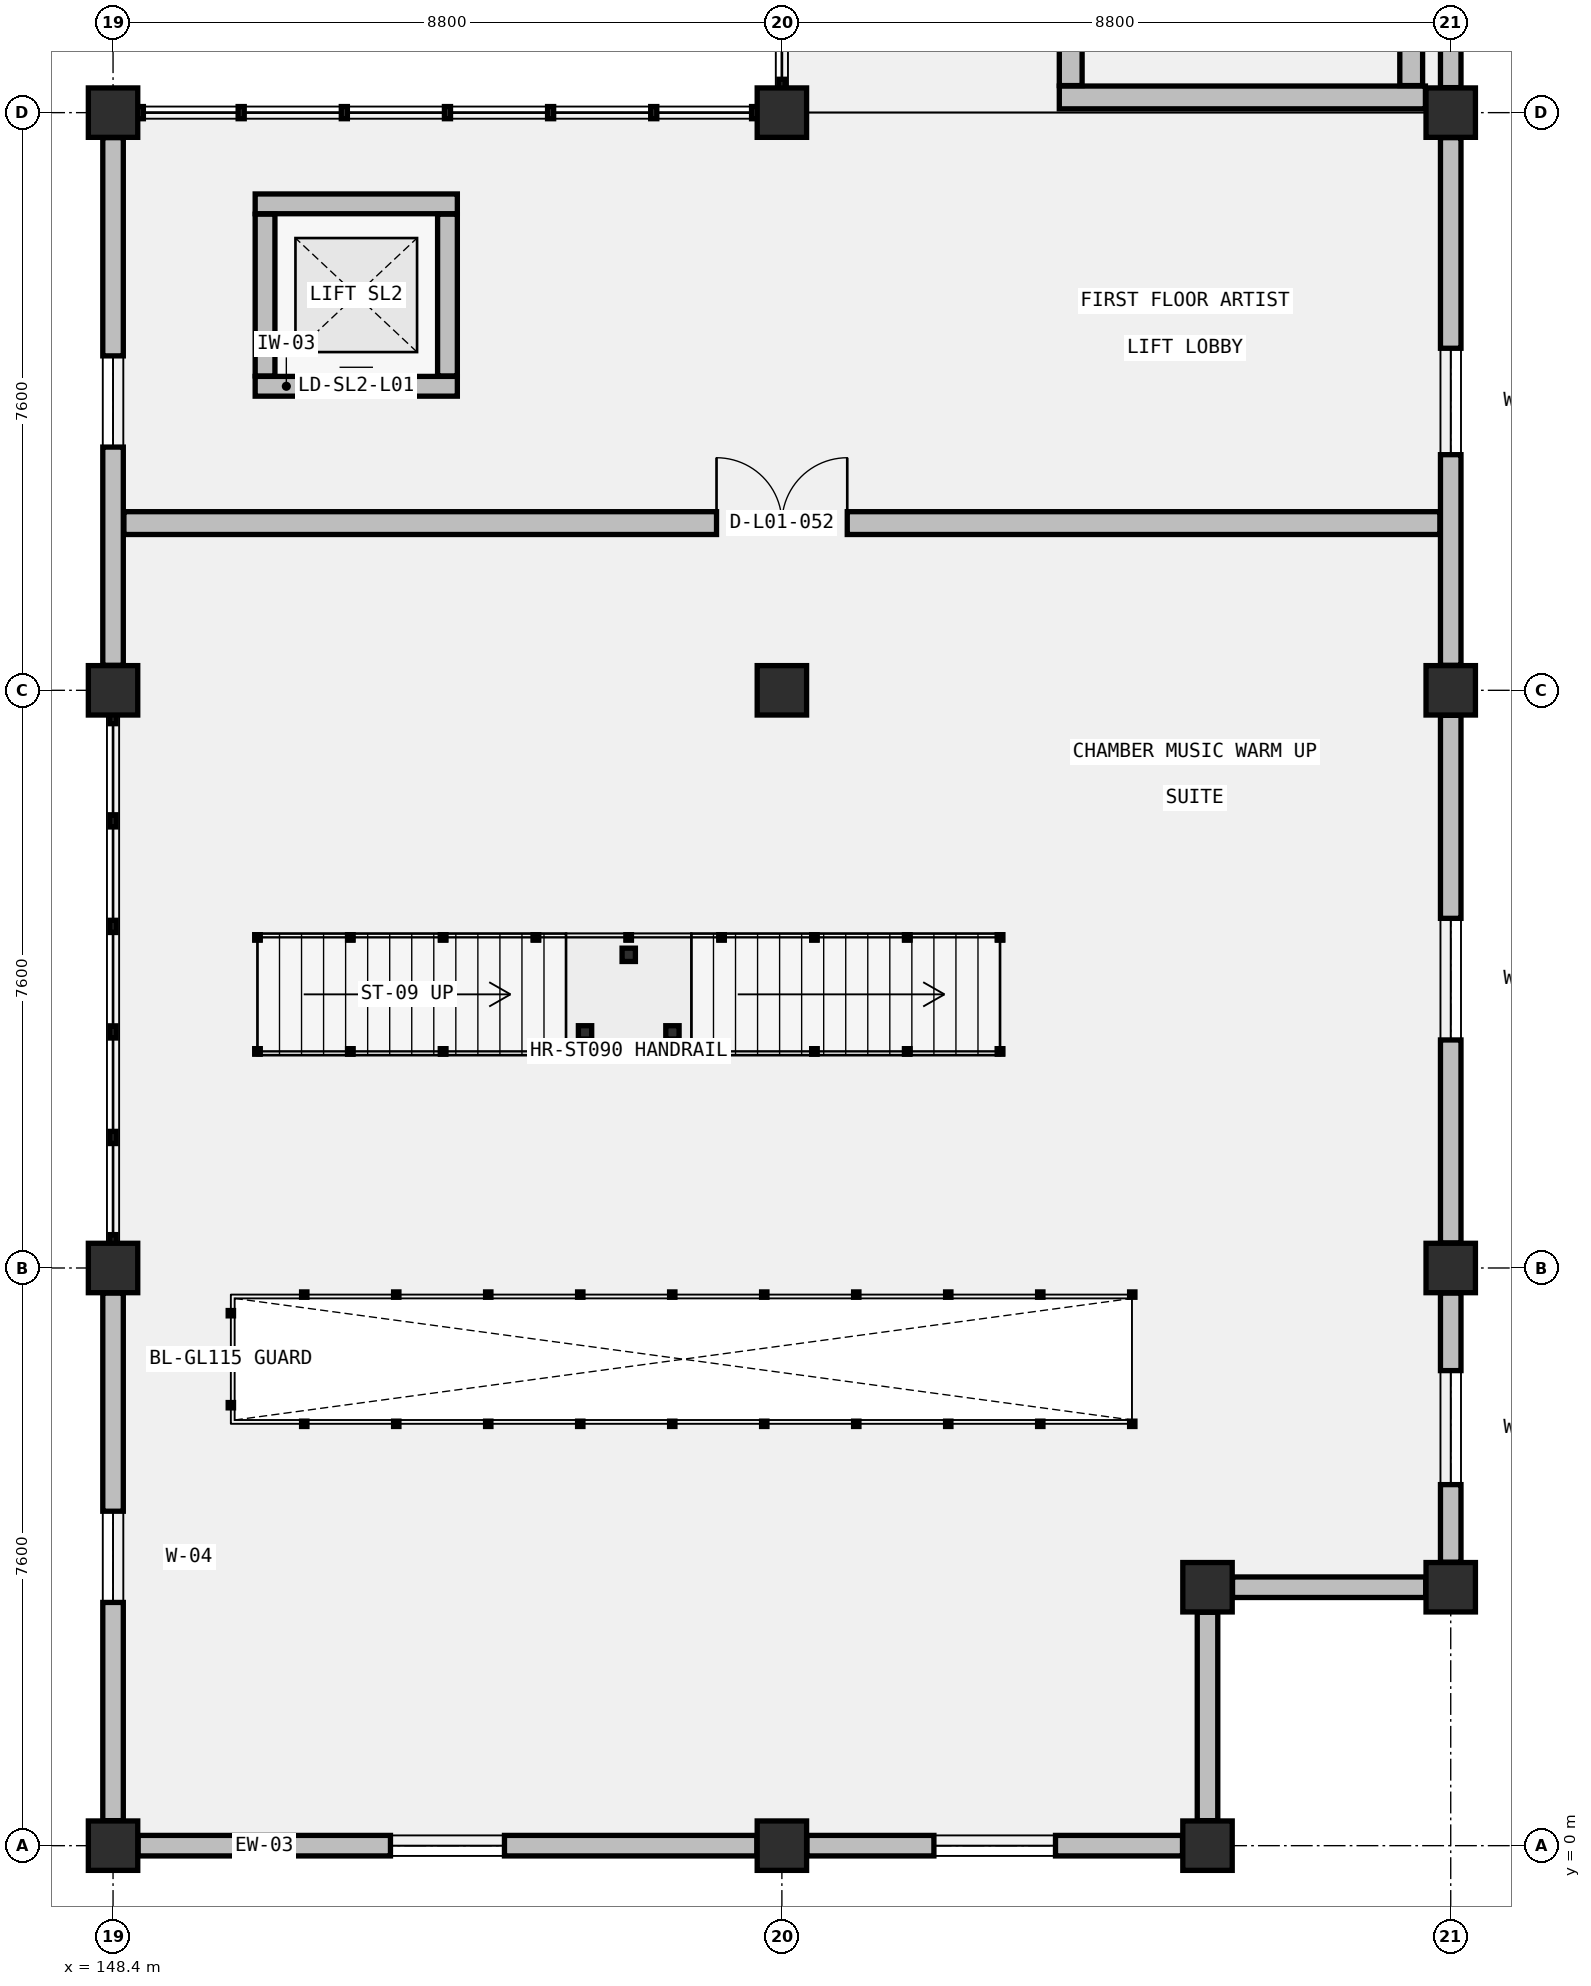
"""IFC4 building model, lengths in metres.
Left out: names, types, materials, properties, quantities, classifications, styles, units other than length and angle.
Written with IfcOpenShell. Run it as: python <this file> out.ifc"""

import sys

from ifc_helpers import new_model, si_unit, direction, frame, frame_2d, origin, origin_2d, place, context, subcontext, project, spatial, rectangle, i_section, extrude, element, fill, save


model = new_model("IFC4")
c1 = context("Model", 3, precision=1e-05, world=origin(), true_north=direction((0.0, 1.0)))
c2 = subcontext(c1, "Body", "Model", "MODEL_VIEW")
j1 = project(units=[si_unit("LENGTHUNIT", "METRE"), si_unit("PLANEANGLEUNIT", "RADIAN")], contexts=[c1])
p1 = place(None, origin())
s1 = spatial("IfcSite", under=j1, at=p1, CompositionType="ELEMENT")
p2 = place(p1, origin())
s2 = spatial("IfcBuilding", under=s1, at=p2, CompositionType="ELEMENT")
p3 = place(p2, frame((0.0, 0.0, 5.4)))
s3 = spatial("IfcBuildingStorey", under=s2, at=p3, CompositionType="ELEMENT", Elevation=5.4)
for number, where, z_axis, x_axis in (
    (1, (148.4, 0.0, 0.0), (0.0, 0.0, 1.0), (1.0, 0.0, 0.0)),
    (2, (148.4, 7.6, 0.0), (0.0, 0.0, 1.0), (1.0, 0.0, 0.0)),
    (3, (148.4, 15.2, 0.0), (0.0, 0.0, 1.0), (1.0, 0.0, 0.0)),
    (4, (148.4, 22.8, 0.0), (0.0, 0.0, 1.0), (1.0, 0.0, 0.0)),
    (5, (157.2, 0.0, 0.0), (0.0, 0.0, 1.0), (1.0, 0.0, 0.0)),
    (6, (157.2, 15.2, 0.0), (0.0, 0.0, 1.0), (1.0, 0.0, 0.0)),
    (7, (157.2, 22.8, 0.0), (0.0, 0.0, 1.0), (1.0, 0.0, 0.0)),
    (8, (166.0, 7.6, 0.0), (0.0, 0.0, 1.0), (1.0, 0.0, 0.0)),
    (9, (166.0, 15.2, 0.0), (0.0, 0.0, 1.0), (1.0, 0.0, 0.0)),
    (10, (166.0, 22.8, 0.0), (0.0, 0.0, 1.0), (1.0, 0.0, 0.0)),
    (11, (162.8, 0.0, 0.0), (0.0, 0.0, 1.0), (1.0, 0.0, 0.0)),
    (12, (162.8, 3.4, 0.0), (0.0, 0.0, 1.0), (1.0, 0.0, 0.0)),
    (13, (166.0, 3.4, 0.0), (0.0, 0.0, 1.0), (1.0, 0.0, 0.0)),
):
    element("IfcColumn", number, at=place(p3, frame(where, z_axis=z_axis, x_axis=x_axis)), inside=s3, PredefinedType="COLUMN", context=c2, shape_type="SweptSolid", body=[
        extrude(rectangle(XDim=0.65, YDim=0.65, at=origin_2d()), origin(), (0.0, 0.0, 1.0), 4.6),
    ])
p4 = place(p3, frame((166.0, 3.729, 0.0), z_axis=(0.0, 0.0, 1.0), x_axis=(0.0, 1.0, 0.0)))
e14 = element("IfcWall", 14, at=p4, inside=s3, PredefinedType="STANDARD", context=c2, shape_type="SweptSolid", body=[
    extrude(rectangle(XDim=3.542, YDim=0.27, at=frame_2d((1.771, 0.0))), origin(), (0.0, 0.0, 1.0), 4.044),
])
p5 = place(p4, frame((1.021, 0.0, 0.9)))
e15 = element("IfcOpeningElement", 15, at=p5, cuts=e14, PredefinedType="OPENING", context=c2, shape_type="SweptSolid", body=[
    extrude(rectangle(XDim=1.5, YDim=2.15, at=frame_2d((0.75, 1.075))), frame((0.0, 0.145, 0.0), z_axis=(0.0, -1.0, 0.0), x_axis=(1.0, 0.0, 0.0)), (0.0, 0.0, 1.0), 0.29),
])
p6 = place(p3, frame((166.0, 7.929, 0.0), z_axis=(0.0, 0.0, 1.0), x_axis=(0.0, 1.0, 0.0)))
e16 = element("IfcWall", 16, at=p6, inside=s3, PredefinedType="STANDARD", context=c2, shape_type="SweptSolid", body=[
    extrude(rectangle(XDim=6.942, YDim=0.27, at=frame_2d((3.471, 0.0))), origin(), (0.0, 0.0, 1.0), 4.044),
])
p7 = place(p6, frame((2.671, 0.0, 0.9)))
e17 = element("IfcOpeningElement", 17, at=p7, cuts=e16, PredefinedType="OPENING", context=c2, shape_type="SweptSolid", body=[
    extrude(rectangle(XDim=1.6, YDim=1.8, at=frame_2d((0.8, 0.9))), frame((0.0, 0.145, 0.0), z_axis=(0.0, -1.0, 0.0), x_axis=(1.0, 0.0, 0.0)), (0.0, 0.0, 1.0), 0.29),
])
p8 = place(p3, frame((166.0, 15.529, 0.0), z_axis=(0.0, 0.0, 1.0), x_axis=(0.0, 1.0, 0.0)))
e18 = element("IfcWall", 18, at=p8, inside=s3, PredefinedType="STANDARD", context=c2, shape_type="SweptSolid", body=[
    extrude(rectangle(XDim=6.942, YDim=0.27, at=frame_2d((3.471, 0.0))), origin(), (0.0, 0.0, 1.0), 4.044),
])
p9 = place(p8, frame((2.771, 0.0, 0.9)))
e19 = element("IfcOpeningElement", 19, at=p9, cuts=e18, PredefinedType="OPENING", context=c2, shape_type="SweptSolid", body=[
    extrude(rectangle(XDim=1.4, YDim=1.2, at=frame_2d((0.7, 0.6))), frame((0.0, 0.145, 0.0), z_axis=(0.0, -1.0, 0.0), x_axis=(1.0, 0.0, 0.0)), (0.0, 0.0, 1.0), 0.29),
])
p10 = place(p3, frame((166.0, 23.129, 0.0), z_axis=(0.0, 0.0, 1.0), x_axis=(0.0, 1.0, 0.0)))
e20 = element("IfcWall", 20, at=p10, inside=s3, PredefinedType="STANDARD", context=c2, shape_type="SweptSolid", body=[
    extrude(rectangle(XDim=6.942, YDim=0.27, at=frame_2d((3.471, 0.0))), origin(), (0.0, 0.0, 1.0), 4.044),
])
p11 = place(p10, frame((2.171, 0.0, 0.9)))
e21 = element("IfcOpeningElement", 21, at=p11, cuts=e20, PredefinedType="OPENING", context=c2, shape_type="SweptSolid", body=[
    extrude(rectangle(XDim=2.6, YDim=2.2, at=frame_2d((1.3, 1.1))), frame((0.0, 0.145, 0.0), z_axis=(0.0, -1.0, 0.0), x_axis=(1.0, 0.0, 0.0)), (0.0, 0.0, 1.0), 0.29),
])
p12 = place(p3, frame((148.729, 0.0, 0.0), z_axis=(0.0, 0.0, 1.0), x_axis=(1.0, 0.0, 0.0)))
e22 = element("IfcWall", 22, at=p12, inside=s3, PredefinedType="STANDARD", context=c2, shape_type="SweptSolid", body=[
    extrude(rectangle(XDim=8.142, YDim=0.27, at=frame_2d((4.071, 0.0))), origin(), (0.0, 0.0, 1.0), 3.898),
])
p13 = place(p12, frame((3.321, 0.0, 0.9)))
e23 = element("IfcOpeningElement", 23, at=p13, cuts=e22, PredefinedType="OPENING", context=c2, shape_type="SweptSolid", body=[
    extrude(rectangle(XDim=1.5, YDim=2.15, at=frame_2d((0.75, 1.075))), frame((0.0, 0.145, 0.0), z_axis=(0.0, -1.0, 0.0), x_axis=(1.0, 0.0, 0.0)), (0.0, 0.0, 1.0), 0.29),
])
p14 = place(p3, frame((157.529, 0.0, 0.0), z_axis=(0.0, 0.0, 1.0), x_axis=(1.0, 0.0, 0.0)))
e24 = element("IfcWall", 24, at=p14, inside=s3, PredefinedType="STANDARD", context=c2, shape_type="SweptSolid", body=[
    extrude(rectangle(XDim=4.942, YDim=0.27, at=frame_2d((2.471, 0.0))), origin(), (0.0, 0.0, 1.0), 3.898),
])
p15 = place(p14, frame((1.671, 0.0, 0.9)))
e25 = element("IfcOpeningElement", 25, at=p15, cuts=e24, PredefinedType="OPENING", context=c2, shape_type="SweptSolid", body=[
    extrude(rectangle(XDim=1.6, YDim=1.8, at=frame_2d((0.8, 0.9))), frame((0.0, 0.145, 0.0), z_axis=(0.0, -1.0, 0.0), x_axis=(1.0, 0.0, 0.0)), (0.0, 0.0, 1.0), 0.29),
])
p16 = place(p3, frame((162.8, 0.329, 0.0), z_axis=(0.0, 0.0, 1.0), x_axis=(0.0, 1.0, 0.0)))
e26 = element("IfcWall", 26, at=p16, inside=s3, PredefinedType="STANDARD", context=c2, shape_type="SweptSolid", body=[
    extrude(rectangle(XDim=2.742, YDim=0.27, at=frame_2d((1.371, 0.0))), origin(), (0.0, 0.0, 1.0), 4.044),
])
p17 = place(p3, frame((163.129, 3.4, 0.0), z_axis=(0.0, 0.0, 1.0), x_axis=(1.0, 0.0, 0.0)))
e27 = element("IfcWall", 27, at=p17, inside=s3, PredefinedType="STANDARD", context=c2, shape_type="SweptSolid", body=[
    extrude(rectangle(XDim=2.542, YDim=0.27, at=frame_2d((1.271, 0.0))), origin(), (0.0, 0.0, 1.0), 3.898),
])
p18 = place(p3, frame((148.4, 0.329, 0.0), z_axis=(0.0, 0.0, 1.0), x_axis=(0.0, 1.0, 0.0)))
e28 = element("IfcWall", 28, at=p18, inside=s3, PredefinedType="STANDARD", context=c2, shape_type="SweptSolid", body=[
    extrude(rectangle(XDim=6.942, YDim=0.27, at=frame_2d((3.471, 0.0))), origin(), (0.0, 0.0, 1.0), 4.044),
])
p19 = place(p18, frame((2.871, 0.0, 0.9)))
e29 = element("IfcOpeningElement", 29, at=p19, cuts=e28, PredefinedType="OPENING", context=c2, shape_type="SweptSolid", body=[
    extrude(rectangle(XDim=1.2, YDim=2.15, at=frame_2d((0.6, 1.075))), frame((0.0, 0.145, 0.0), z_axis=(0.0, -1.0, 0.0), x_axis=(1.0, 0.0, 0.0)), (0.0, 0.0, 1.0), 0.29),
])
p20 = place(p3, frame((148.4, 15.529, 0.0), z_axis=(0.0, 0.0, 1.0), x_axis=(0.0, 1.0, 0.0)))
e30 = element("IfcWall", 30, at=p20, inside=s3, PredefinedType="STANDARD", context=c2, shape_type="SweptSolid", body=[
    extrude(rectangle(XDim=6.942, YDim=0.27, at=frame_2d((3.471, 0.0))), origin(), (0.0, 0.0, 1.0), 4.044),
])
p21 = place(p20, frame((2.871, 0.0, 0.9)))
e31 = element("IfcOpeningElement", 31, at=p21, cuts=e30, PredefinedType="OPENING", context=c2, shape_type="SweptSolid", body=[
    extrude(rectangle(XDim=1.2, YDim=2.15, at=frame_2d((0.6, 1.075))), frame((0.0, 0.145, 0.0), z_axis=(0.0, -1.0, 0.0), x_axis=(1.0, 0.0, 0.0)), (0.0, 0.0, 1.0), 0.29),
])
for number, where, z_axis, x_axis in (
    (32, (154.61, 10.7, 0.0), (0.0, 0.0, 1.0), (1.0, 0.0, 0.0)),
    (33, (155.76, 10.7, 0.0), (0.0, 0.0, 1.0), (1.0, 0.0, 0.0)),
    (34, (155.185, 11.72, 0.0), (0.0, 0.0, 1.0), (1.0, 0.0, 0.0)),
):
    element("IfcColumn", number, at=place(p3, frame(where, z_axis=z_axis, x_axis=x_axis)), inside=s3, PredefinedType="COLUMN", context=c2, shape_type="SweptSolid", body=[
        extrude(i_section(OverallWidth=0.175, OverallDepth=0.175, WebThickness=0.008, FlangeThickness=0.011, FilletRadius=0.013, at=origin_2d()), origin(), (0.0, 0.0, 1.0), 2.13),
    ])
p22 = place(p3, frame((150.27, 19.2, 0.0), z_axis=(0.0, 0.0, 1.0), x_axis=(1.0, 0.0, 0.0)))
e35 = element("IfcWall", 35, at=p22, inside=s3, PredefinedType="STANDARD", context=c2, shape_type="SweptSolid", body=[
    extrude(rectangle(XDim=2.66, YDim=0.26, at=frame_2d((1.33, 0.0))), origin(), (0.0, 0.0, 1.0), 3.988),
])
p23 = place(p22, frame((0.82, 0.0, 0.0)))
e36 = element("IfcOpeningElement", 36, at=p23, cuts=e35, PredefinedType="OPENING", context=c2, shape_type="SweptSolid", body=[
    extrude(rectangle(XDim=1.02, YDim=2.1, at=frame_2d((0.51, 1.05))), frame((0.0, 0.14, 0.0), z_axis=(0.0, -1.0, 0.0), x_axis=(1.0, 0.0, 0.0)), (0.0, 0.0, 1.0), 0.28),
])
p24 = place(p3, frame((150.27, 21.6, 0.0), z_axis=(0.0, 0.0, 1.0), x_axis=(1.0, 0.0, 0.0)))
e37 = element("IfcWall", 37, at=p24, inside=s3, PredefinedType="STANDARD", context=c2, shape_type="SweptSolid", body=[
    extrude(rectangle(XDim=2.66, YDim=0.26, at=frame_2d((1.33, 0.0))), origin(), (0.0, 0.0, 1.0), 3.988),
])
p25 = place(p3, frame((150.4, 19.336, 0.0), z_axis=(0.0, 0.0, 1.0), x_axis=(0.0, 1.0, 0.0)))
e38 = element("IfcWall", 38, at=p25, inside=s3, PredefinedType="STANDARD", context=c2, shape_type="SweptSolid", body=[
    extrude(rectangle(XDim=2.128, YDim=0.26, at=frame_2d((1.064, 0.0))), origin(), (0.0, 0.0, 1.0), 4.36),
])
p26 = place(p3, frame((152.8, 19.336, 0.0), z_axis=(0.0, 0.0, 1.0), x_axis=(0.0, 1.0, 0.0)))
e39 = element("IfcWall", 39, at=p26, inside=s3, PredefinedType="STANDARD", context=c2, shape_type="SweptSolid", body=[
    extrude(rectangle(XDim=2.128, YDim=0.26, at=frame_2d((1.064, 0.0))), origin(), (0.0, 0.0, 1.0), 3.988),
])
p27 = place(p3, frame((148.543, 17.4, 0.0), z_axis=(0.0, 0.0, 1.0), x_axis=(1.0, 0.0, 0.0)))
e40 = element("IfcWall", 40, at=p27, inside=s3, PredefinedType="PARTITIONING", context=c2, shape_type="SweptSolid", body=[
    extrude(rectangle(XDim=17.314, YDim=0.3, at=frame_2d((8.657, 0.0))), origin(), (0.0, 0.0, 1.0), 3.988),
])
p28 = place(p27, frame((7.797, 0.0, 0.0)))
e41 = element("IfcOpeningElement", 41, at=p28, cuts=e40, PredefinedType="OPENING", context=c2, shape_type="SweptSolid", body=[
    extrude(rectangle(XDim=1.72, YDim=2.38, at=frame_2d((0.86, 1.19))), frame((0.0, 0.16, 0.0), z_axis=(0.0, -1.0, 0.0), x_axis=(1.0, 0.0, 0.0)), (0.0, 0.0, 1.0), 0.32),
])
p29 = place(p3, frame((160.85, 23.0, 0.0), z_axis=(0.0, 0.0, 1.0), x_axis=(1.0, 0.0, 0.0)))
e42 = element("IfcWall", 42, at=p29, inside=s3, PredefinedType="PARTITIONING", context=c2, shape_type="SweptSolid", body=[
    extrude(rectangle(XDim=4.817, YDim=0.3, at=frame_2d((2.408, 0.0))), origin(), (0.0, 0.0, 1.0), 3.898),
])
p30 = place(p3, frame((161.0, 23.156, 0.0), z_axis=(0.0, 0.0, 1.0), x_axis=(0.0, 1.0, 0.0)))
e43 = element("IfcWall", 43, at=p30, inside=s3, PredefinedType="PARTITIONING", context=c2, shape_type="SweptSolid", body=[
    extrude(rectangle(XDim=29.488, YDim=0.3, at=frame_2d((14.744, 0.0))), origin(), (0.0, 0.0, 1.0), 3.898),
])
p31 = place(p30, frame((13.884, 0.0, 0.0)))
e44 = element("IfcOpeningElement", 44, at=p31, cuts=e43, PredefinedType="OPENING", context=c2, shape_type="SweptSolid", body=[
    extrude(rectangle(XDim=1.72, YDim=2.38, at=frame_2d((0.86, 1.19))), frame((0.0, 0.16, 0.0), z_axis=(0.0, -1.0, 0.0), x_axis=(1.0, 0.0, 0.0)), (0.0, 0.0, 1.0), 0.32),
])
p32 = place(p3, frame((165.48, 23.156, 0.0), z_axis=(0.0, 0.0, 1.0), x_axis=(0.0, 1.0, 0.0)))
e45 = element("IfcWall", 45, at=p32, inside=s3, PredefinedType="PARTITIONING", context=c2, shape_type="SweptSolid", body=[
    extrude(rectangle(XDim=29.488, YDim=0.3, at=frame_2d((14.744, 0.0))), origin(), (0.0, 0.0, 1.0), 3.898),
])
p33 = place(p5, origin())
e46 = element("IfcWindow", 46, at=p33, inside=s3, PartitioningType="DOUBLE_PANEL_VERTICAL", PredefinedType="WINDOW", context=c2, shape_type="SweptSolid", body=[
    extrude(rectangle(XDim=1.5, YDim=2.15, at=frame_2d((0.75, 1.075))), frame((0.0, 0.03, 0.0), z_axis=(0.0, -1.0, 0.0), x_axis=(1.0, 0.0, 0.0)), (0.0, 0.0, 1.0), 0.06),
])
fill(e15, e46)
p34 = place(p7, origin())
e47 = element("IfcWindow", 47, at=p34, inside=s3, PartitioningType="DOUBLE_PANEL_VERTICAL", PredefinedType="WINDOW", context=c2, shape_type="SweptSolid", body=[
    extrude(rectangle(XDim=1.6, YDim=1.8, at=frame_2d((0.8, 0.9))), frame((0.0, 0.03, 0.0), z_axis=(0.0, -1.0, 0.0), x_axis=(1.0, 0.0, 0.0)), (0.0, 0.0, 1.0), 0.06),
])
fill(e17, e47)
p35 = place(p9, origin())
e48 = element("IfcWindow", 48, at=p35, inside=s3, PartitioningType="SINGLE_PANEL", PredefinedType="WINDOW", context=c2, shape_type="SweptSolid", body=[
    extrude(rectangle(XDim=1.4, YDim=1.2, at=frame_2d((0.7, 0.6))), frame((0.0, 0.03, 0.0), z_axis=(0.0, -1.0, 0.0), x_axis=(1.0, 0.0, 0.0)), (0.0, 0.0, 1.0), 0.06),
])
fill(e19, e48)
p36 = place(p13, origin())
e49 = element("IfcWindow", 49, at=p36, inside=s3, PartitioningType="DOUBLE_PANEL_VERTICAL", PredefinedType="WINDOW", context=c2, shape_type="SweptSolid", body=[
    extrude(rectangle(XDim=1.5, YDim=2.15, at=frame_2d((0.75, 1.075))), frame((0.0, 0.03, 0.0), z_axis=(0.0, -1.0, 0.0), x_axis=(1.0, 0.0, 0.0)), (0.0, 0.0, 1.0), 0.06),
])
fill(e23, e49)
p37 = place(p15, origin())
e50 = element("IfcWindow", 50, at=p37, inside=s3, PartitioningType="DOUBLE_PANEL_VERTICAL", PredefinedType="WINDOW", context=c2, shape_type="SweptSolid", body=[
    extrude(rectangle(XDim=1.6, YDim=1.8, at=frame_2d((0.8, 0.9))), frame((0.0, 0.03, 0.0), z_axis=(0.0, -1.0, 0.0), x_axis=(1.0, 0.0, 0.0)), (0.0, 0.0, 1.0), 0.06),
])
fill(e25, e50)
p38 = place(p19, origin())
e51 = element("IfcWindow", 51, at=p38, inside=s3, PartitioningType="SINGLE_PANEL", PredefinedType="WINDOW", context=c2, shape_type="SweptSolid", body=[
    extrude(rectangle(XDim=1.2, YDim=2.15, at=frame_2d((0.6, 1.075))), frame((0.0, 0.03, 0.0), z_axis=(0.0, -1.0, 0.0), x_axis=(1.0, 0.0, 0.0)), (0.0, 0.0, 1.0), 0.06),
])
fill(e29, e51)
p39 = place(p21, origin())
e52 = element("IfcWindow", 52, at=p39, inside=s3, PartitioningType="SINGLE_PANEL", PredefinedType="WINDOW", context=c2, shape_type="SweptSolid", body=[
    extrude(rectangle(XDim=1.2, YDim=2.15, at=frame_2d((0.6, 1.075))), frame((0.0, 0.03, 0.0), z_axis=(0.0, -1.0, 0.0), x_axis=(1.0, 0.0, 0.0)), (0.0, 0.0, 1.0), 0.06),
])
fill(e31, e52)
p40 = place(p23, origin())
e53 = element("IfcDoor", 53, at=p40, inside=s3, OperationType="SLIDING_TO_RIGHT", PredefinedType="DOOR", context=c2, shape_type="SweptSolid", body=[
    extrude(rectangle(XDim=1.02, YDim=2.1, at=frame_2d((0.51, 1.05))), frame((0.0, 0.025, 0.0), z_axis=(0.0, -1.0, 0.0), x_axis=(1.0, 0.0, 0.0)), (0.0, 0.0, 1.0), 0.05),
])
fill(e36, e53)
p41 = place(p28, origin())
e54 = element("IfcDoor", 54, at=p41, inside=s3, OperationType="DOUBLE_DOOR_SINGLE_SWING", PredefinedType="DOOR", context=c2, shape_type="SweptSolid", body=[
    extrude(rectangle(XDim=1.72, YDim=2.38, at=frame_2d((0.86, 1.19))), frame((0.0, 0.025, 0.0), z_axis=(0.0, -1.0, 0.0), x_axis=(1.0, 0.0, 0.0)), (0.0, 0.0, 1.0), 0.05),
])
fill(e41, e54)
save(model, sys.argv[1])
